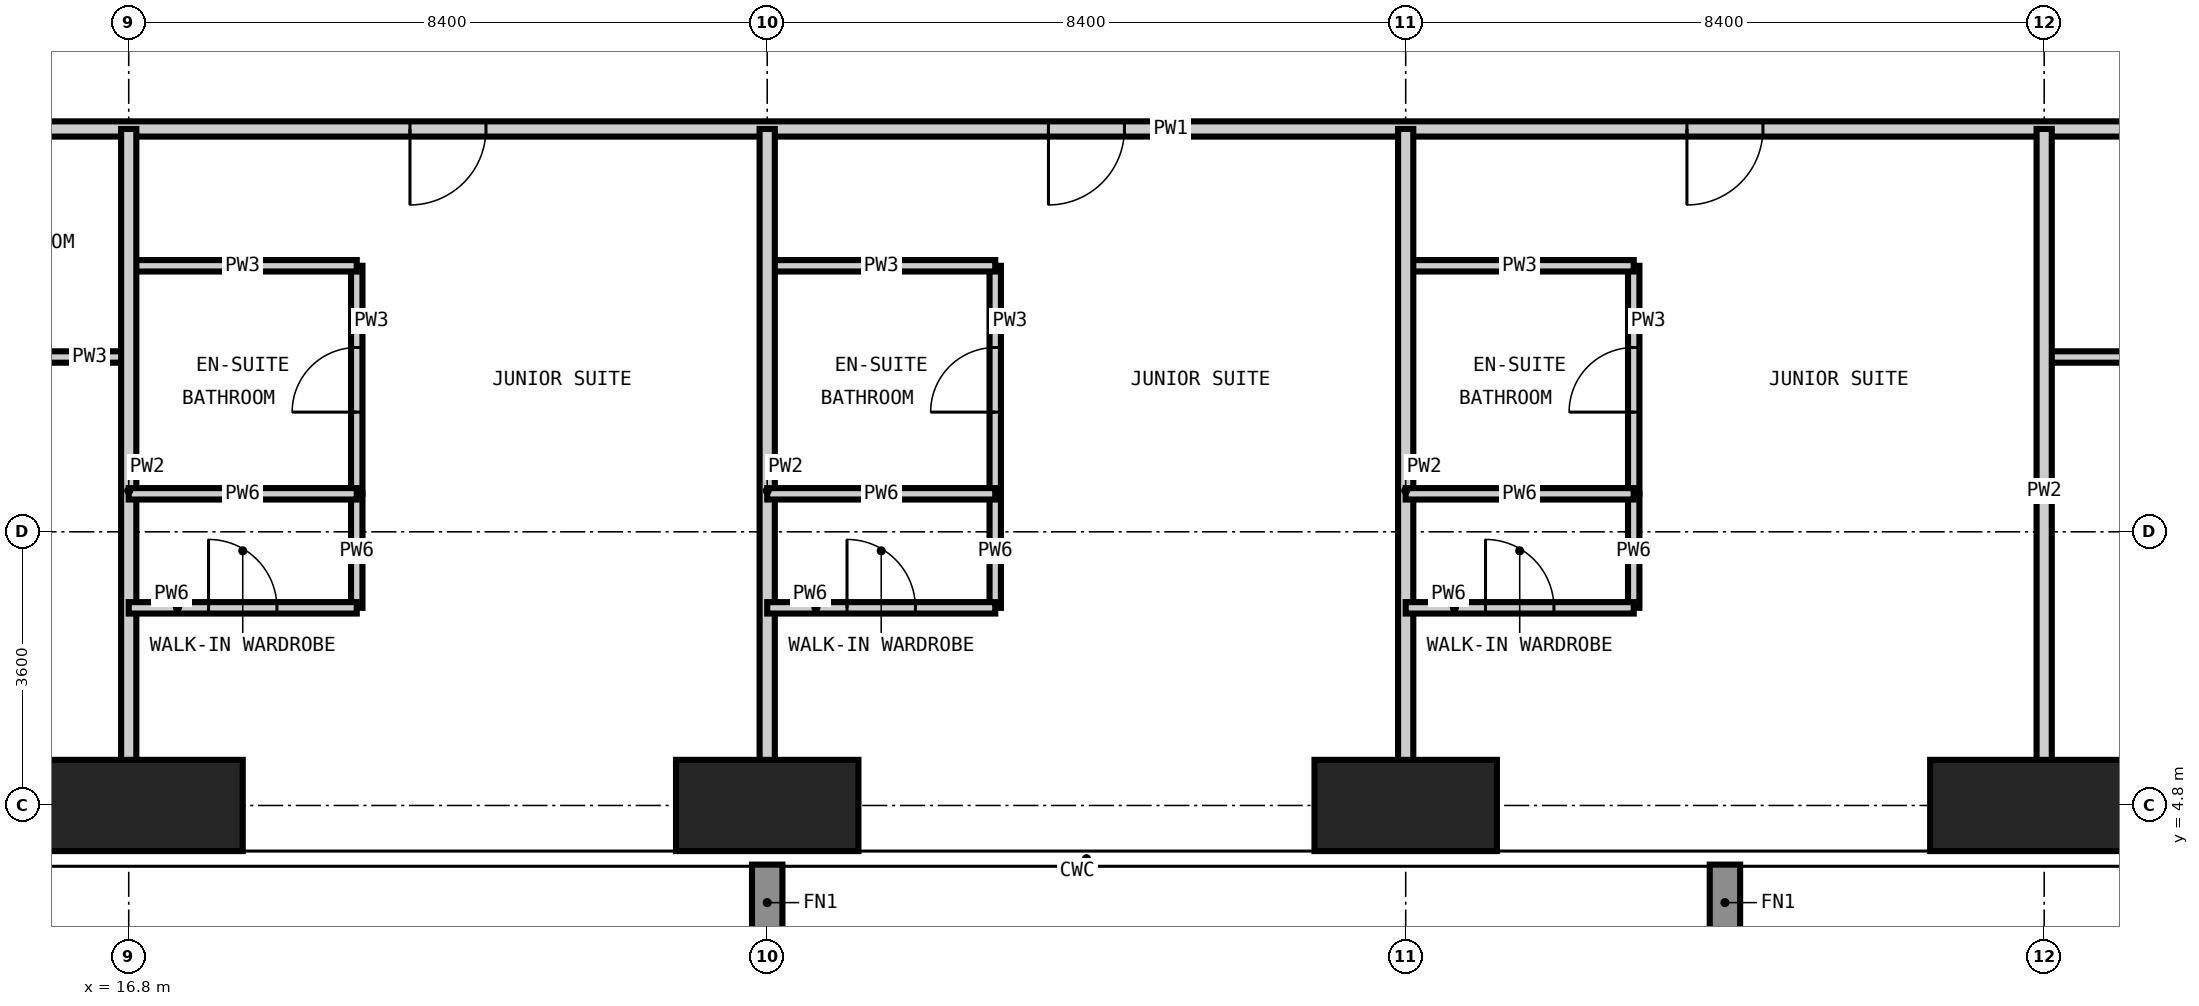
"""IFC4 building model, lengths in metres.
Left out: names, types, materials, properties, quantities, classifications, styles, units other than length and angle.
Written with IfcOpenShell. Run it as: python <this file> out.ifc"""

import sys

from ifc_helpers import new_model, si_unit, direction, frame, frame_2d, origin, origin_2d, place, context, subcontext, project, spatial, rectangle, extrude, element, fill, save


model = new_model("IFC4")
c1 = context("Model", 3, precision=1e-05, world=origin(), true_north=direction((0.0, 1.0)))
c2 = subcontext(c1, "Body", "Model", "MODEL_VIEW")
j1 = project(units=[si_unit("LENGTHUNIT", "METRE"), si_unit("PLANEANGLEUNIT", "RADIAN")], contexts=[c1])
p1 = place(None, origin())
s1 = spatial("IfcSite", under=j1, at=p1, CompositionType="ELEMENT")
p2 = place(p1, origin())
s2 = spatial("IfcBuilding", under=s1, at=p2, CompositionType="ELEMENT")
p3 = place(p2, frame((0.0, 0.0, 162.6)))
s3 = spatial("IfcBuildingStorey", under=s2, at=p3, CompositionType="ELEMENT", Elevation=162.6)
p4 = place(p3, frame((16.8, 4.8, -0.35), z_axis=(0.0, 0.0, 1.0), x_axis=(1.0, 0.0, 0.0)))
e1 = element("IfcColumn", 1, at=p4, inside=s3, PredefinedType="COLUMN", context=c2, shape_type="SweptSolid", body=[
    extrude(rectangle(XDim=3.0, YDim=1.2, at=origin_2d()), origin(), (0.0, 0.0, 1.0), 3.6),
])
for number, where, z_axis, x_axis in (
    (2, (25.2, 4.8, -0.35), (0.0, 0.0, 1.0), (1.0, 0.0, 0.0)),
    (3, (33.6, 4.8, -0.35), (0.0, 0.0, 1.0), (1.0, 0.0, 0.0)),
):
    element("IfcColumn", number, at=place(p3, frame(where, z_axis=z_axis, x_axis=x_axis)), inside=s3, PredefinedType="COLUMN", context=c2, shape_type="SweptSolid", body=[
        extrude(rectangle(XDim=2.4, YDim=1.2, at=origin_2d()), origin(), (0.0, 0.0, 1.0), 3.6),
    ])
p5 = place(p3, frame((42.0, 4.8, -0.35), z_axis=(0.0, 0.0, 1.0), x_axis=(1.0, 0.0, 0.0)))
e4 = element("IfcColumn", 4, at=p5, inside=s3, PredefinedType="COLUMN", context=c2, shape_type="SweptSolid", body=[
    extrude(rectangle(XDim=3.0, YDim=1.2, at=origin_2d()), origin(), (0.0, 0.0, 1.0), 3.6),
])
p6 = place(p3, frame((19.8, 8.9, 0.0), z_axis=(0.0, 0.0, 1.0), x_axis=(0.0, 1.0, 0.0)))
e5 = element("IfcWall", 5, at=p6, inside=s3, PredefinedType="PARTITIONING", context=c2, shape_type="SweptSolid", body=[
    extrude(rectangle(XDim=3.0, YDim=0.15, at=frame_2d((1.5, 0.0))), origin(), (0.0, 0.0, 1.0), 3.25),
])
p7 = place(p6, frame((1.075, 0.0, 0.0)))
e6 = element("IfcOpeningElement", 6, at=p7, cuts=e5, PredefinedType="OPENING", context=c2, shape_type="SweptSolid", body=[
    extrude(rectangle(XDim=0.85, YDim=2.1, at=frame_2d((0.425, 1.05))), frame((0.0, 0.085, 0.0), z_axis=(0.0, -1.0, 0.0), x_axis=(1.0, 0.0, 0.0)), (0.0, 0.0, 1.0), 0.17),
])
p8 = place(p3, frame((28.2, 8.9, 0.0), z_axis=(0.0, 0.0, 1.0), x_axis=(0.0, 1.0, 0.0)))
e7 = element("IfcWall", 7, at=p8, inside=s3, PredefinedType="PARTITIONING", context=c2, shape_type="SweptSolid", body=[
    extrude(rectangle(XDim=3.0, YDim=0.15, at=frame_2d((1.5, 0.0))), origin(), (0.0, 0.0, 1.0), 3.25),
])
p9 = place(p8, frame((1.075, 0.0, 0.0)))
e8 = element("IfcOpeningElement", 8, at=p9, cuts=e7, PredefinedType="OPENING", context=c2, shape_type="SweptSolid", body=[
    extrude(rectangle(XDim=0.85, YDim=2.1, at=frame_2d((0.425, 1.05))), frame((0.0, 0.085, 0.0), z_axis=(0.0, -1.0, 0.0), x_axis=(1.0, 0.0, 0.0)), (0.0, 0.0, 1.0), 0.17),
])
p10 = place(p3, frame((36.6, 8.9, 0.0), z_axis=(0.0, 0.0, 1.0), x_axis=(0.0, 1.0, 0.0)))
e9 = element("IfcWall", 9, at=p10, inside=s3, PredefinedType="PARTITIONING", context=c2, shape_type="SweptSolid", body=[
    extrude(rectangle(XDim=3.0, YDim=0.15, at=frame_2d((1.5, 0.0))), origin(), (0.0, 0.0, 1.0), 3.25),
])
p11 = place(p10, frame((1.075, 0.0, 0.0)))
e10 = element("IfcOpeningElement", 10, at=p11, cuts=e9, PredefinedType="OPENING", context=c2, shape_type="SweptSolid", body=[
    extrude(rectangle(XDim=0.85, YDim=2.1, at=frame_2d((0.425, 1.05))), frame((0.0, 0.085, 0.0), z_axis=(0.0, -1.0, 0.0), x_axis=(1.0, 0.0, 0.0)), (0.0, 0.0, 1.0), 0.17),
])
p12 = place(p3, frame((13.7, 10.7, 0.0), z_axis=(0.0, 0.0, 1.0), x_axis=(1.0, 0.0, 0.0)))
e11 = element("IfcWall", 11, at=p12, inside=s3, PredefinedType="PARTITIONING", context=c2, shape_type="SweptSolid", body=[
    extrude(rectangle(XDim=3.1, YDim=0.15, at=frame_2d((1.55, 0.0))), origin(), (0.0, 0.0, 1.0), 3.25),
])
p13 = place(p12, frame((1.125, 0.0, 0.0)))
e12 = element("IfcOpeningElement", 12, at=p13, cuts=e11, PredefinedType="OPENING", context=c2, shape_type="SweptSolid", body=[
    extrude(rectangle(XDim=0.85, YDim=2.1, at=frame_2d((0.425, 1.05))), frame((0.0, 0.085, 0.0), z_axis=(0.0, -1.0, 0.0), x_axis=(1.0, 0.0, 0.0)), (0.0, 0.0, 1.0), 0.17),
])
p14 = place(p3, frame((42.0, 10.7, 0.0), z_axis=(0.0, 0.0, 1.0), x_axis=(1.0, 0.0, 0.0)))
e13 = element("IfcWall", 13, at=p14, inside=s3, PredefinedType="PARTITIONING", context=c2, shape_type="SweptSolid", body=[
    extrude(rectangle(XDim=3.7, YDim=0.15, at=frame_2d((1.85, 0.0))), origin(), (0.0, 0.0, 1.0), 3.25),
])
p15 = place(p14, frame((1.425, 0.0, 0.0)))
e14 = element("IfcOpeningElement", 14, at=p15, cuts=e13, PredefinedType="OPENING", context=c2, shape_type="SweptSolid", body=[
    extrude(rectangle(XDim=0.85, YDim=2.1, at=frame_2d((0.425, 1.05))), frame((0.0, 0.085, 0.0), z_axis=(0.0, -1.0, 0.0), x_axis=(1.0, 0.0, 0.0)), (0.0, 0.0, 1.0), 0.17),
])
for number, where, z_axis, x_axis in (
    (15, (16.8, 11.9, 0.0), (0.0, 0.0, 1.0), (1.0, 0.0, 0.0)),
    (16, (25.2, 11.9, 0.0), (0.0, 0.0, 1.0), (1.0, 0.0, 0.0)),
    (17, (33.6, 11.9, 0.0), (0.0, 0.0, 1.0), (1.0, 0.0, 0.0)),
):
    element("IfcWall", number, at=place(p3, frame(where, z_axis=z_axis, x_axis=x_axis)), inside=s3, PredefinedType="PARTITIONING", context=c2, shape_type="SweptSolid", body=[
        extrude(rectangle(XDim=3.0, YDim=0.15, at=frame_2d((1.5, 0.0))), origin(), (0.0, 0.0, 1.0), 3.25),
    ])
p16 = place(p3, frame((45.7, 13.7, 0.0), z_axis=(0.0, 0.0, 1.0), x_axis=(-1.0, 0.0, 0.0)))
e18 = element("IfcWall", 18, at=p16, inside=s3, PredefinedType="PARTITIONING", context=c2, shape_type="SweptSolid", body=[
    extrude(rectangle(XDim=32.0, YDim=0.2, at=frame_2d((16.0, 0.0))), origin(), (0.0, 0.0, 1.0), 3.25),
])
p17 = place(p16, frame((24.2, 0.0, 0.0)))
e19 = element("IfcOpeningElement", 19, at=p17, cuts=e18, PredefinedType="OPENING", context=c2, shape_type="SweptSolid", body=[
    extrude(rectangle(XDim=1.0, YDim=2.2, at=frame_2d((0.5, 1.1))), frame((0.0, 0.11, 0.0), z_axis=(0.0, -1.0, 0.0), x_axis=(1.0, 0.0, 0.0)), (0.0, 0.0, 1.0), 0.22),
])
p18 = place(p16, frame((15.8, 0.0, 0.0)))
e20 = element("IfcOpeningElement", 20, at=p18, cuts=e18, PredefinedType="OPENING", context=c2, shape_type="SweptSolid", body=[
    extrude(rectangle(XDim=1.0, YDim=2.2, at=frame_2d((0.5, 1.1))), frame((0.0, 0.11, 0.0), z_axis=(0.0, -1.0, 0.0), x_axis=(1.0, 0.0, 0.0)), (0.0, 0.0, 1.0), 0.22),
])
p19 = place(p16, frame((7.4, 0.0, 0.0)))
e21 = element("IfcOpeningElement", 21, at=p19, cuts=e18, PredefinedType="OPENING", context=c2, shape_type="SweptSolid", body=[
    extrude(rectangle(XDim=1.0, YDim=2.2, at=frame_2d((0.5, 1.1))), frame((0.0, 0.11, 0.0), z_axis=(0.0, -1.0, 0.0), x_axis=(1.0, 0.0, 0.0)), (0.0, 0.0, 1.0), 0.22),
])
for number, where, z_axis, x_axis in (
    (22, (16.8, 4.182, 0.0), (0.0, 0.0, 1.0), (0.0, 1.0, 0.0)),
    (23, (25.2, 4.182, 0.0), (0.0, 0.0, 1.0), (0.0, 1.0, 0.0)),
    (24, (33.6, 4.182, 0.0), (0.0, 0.0, 1.0), (0.0, 1.0, 0.0)),
    (25, (42.0, 4.182, 0.0), (0.0, 0.0, 1.0), (0.0, 1.0, 0.0)),
):
    element("IfcWall", number, at=place(p3, frame(where, z_axis=z_axis, x_axis=x_axis)), inside=s3, PredefinedType="PARTITIONING", context=c2, shape_type="SweptSolid", body=[
        extrude(rectangle(XDim=9.518, YDim=0.2, at=frame_2d((4.759, 0.0))), origin(), (0.0, 0.0, 1.0), 3.25),
    ])
for number, where, z_axis, x_axis in (
    (26, (19.8, 7.4, 0.0), (0.0, 0.0, 1.0), (0.0, 1.0, 0.0)),
    (27, (28.2, 7.4, 0.0), (0.0, 0.0, 1.0), (0.0, 1.0, 0.0)),
    (28, (36.6, 7.4, 0.0), (0.0, 0.0, 1.0), (0.0, 1.0, 0.0)),
):
    element("IfcWall", number, at=place(p3, frame(where, z_axis=z_axis, x_axis=x_axis)), inside=s3, PredefinedType="PARTITIONING", context=c2, shape_type="SweptSolid", body=[
        extrude(rectangle(XDim=1.5, YDim=0.15, at=frame_2d((0.75, 0.0))), origin(), (0.0, 0.0, 1.0), 3.25),
    ])
p20 = place(p3, frame((16.8, 7.4, 0.0), z_axis=(0.0, 0.0, 1.0), x_axis=(1.0, 0.0, 0.0)))
e29 = element("IfcWall", 29, at=p20, inside=s3, PredefinedType="PARTITIONING", context=c2, shape_type="SweptSolid", body=[
    extrude(rectangle(XDim=3.0, YDim=0.15, at=frame_2d((1.5, 0.0))), origin(), (0.0, 0.0, 1.0), 3.25),
])
p21 = place(p20, frame((1.05, 0.0, 0.0)))
e30 = element("IfcOpeningElement", 30, at=p21, cuts=e29, PredefinedType="OPENING", context=c2, shape_type="SweptSolid", body=[
    extrude(rectangle(XDim=0.9, YDim=2.1, at=frame_2d((0.45, 1.05))), frame((0.0, 0.085, 0.0), z_axis=(0.0, -1.0, 0.0), x_axis=(1.0, 0.0, 0.0)), (0.0, 0.0, 1.0), 0.17),
])
p22 = place(p3, frame((25.2, 7.4, 0.0), z_axis=(0.0, 0.0, 1.0), x_axis=(1.0, 0.0, 0.0)))
e31 = element("IfcWall", 31, at=p22, inside=s3, PredefinedType="PARTITIONING", context=c2, shape_type="SweptSolid", body=[
    extrude(rectangle(XDim=3.0, YDim=0.15, at=frame_2d((1.5, 0.0))), origin(), (0.0, 0.0, 1.0), 3.25),
])
p23 = place(p22, frame((1.05, 0.0, 0.0)))
e32 = element("IfcOpeningElement", 32, at=p23, cuts=e31, PredefinedType="OPENING", context=c2, shape_type="SweptSolid", body=[
    extrude(rectangle(XDim=0.9, YDim=2.1, at=frame_2d((0.45, 1.05))), frame((0.0, 0.085, 0.0), z_axis=(0.0, -1.0, 0.0), x_axis=(1.0, 0.0, 0.0)), (0.0, 0.0, 1.0), 0.17),
])
p24 = place(p3, frame((33.6, 7.4, 0.0), z_axis=(0.0, 0.0, 1.0), x_axis=(1.0, 0.0, 0.0)))
e33 = element("IfcWall", 33, at=p24, inside=s3, PredefinedType="PARTITIONING", context=c2, shape_type="SweptSolid", body=[
    extrude(rectangle(XDim=3.0, YDim=0.15, at=frame_2d((1.5, 0.0))), origin(), (0.0, 0.0, 1.0), 3.25),
])
p25 = place(p24, frame((1.05, 0.0, 0.0)))
e34 = element("IfcOpeningElement", 34, at=p25, cuts=e33, PredefinedType="OPENING", context=c2, shape_type="SweptSolid", body=[
    extrude(rectangle(XDim=0.9, YDim=2.1, at=frame_2d((0.45, 1.05))), frame((0.0, 0.085, 0.0), z_axis=(0.0, -1.0, 0.0), x_axis=(1.0, 0.0, 0.0)), (0.0, 0.0, 1.0), 0.17),
])
for number, where, z_axis, x_axis in (
    (35, (16.8, 8.9, 0.0), (0.0, 0.0, 1.0), (1.0, 0.0, 0.0)),
    (36, (25.2, 8.9, 0.0), (0.0, 0.0, 1.0), (1.0, 0.0, 0.0)),
    (37, (33.6, 8.9, 0.0), (0.0, 0.0, 1.0), (1.0, 0.0, 0.0)),
):
    element("IfcWall", number, at=place(p3, frame(where, z_axis=z_axis, x_axis=x_axis)), inside=s3, PredefinedType="PARTITIONING", context=c2, shape_type="SweptSolid", body=[
        extrude(rectangle(XDim=3.0, YDim=0.15, at=frame_2d((1.5, 0.0))), origin(), (0.0, 0.0, 1.0), 3.25),
    ])
p26 = place(p17, origin())
e38 = element("IfcDoor", 38, at=p26, inside=s3, OperationType="SINGLE_SWING_RIGHT", PredefinedType="DOOR", context=c2, shape_type="SweptSolid", body=[
    extrude(rectangle(XDim=1.0, YDim=2.2, at=frame_2d((0.5, 1.1))), frame((0.0, 0.025, 0.0), z_axis=(0.0, -1.0, 0.0), x_axis=(1.0, 0.0, 0.0)), (0.0, 0.0, 1.0), 0.05),
])
fill(e19, e38)
p27 = place(p7, origin())
e39 = element("IfcDoor", 39, at=p27, inside=s3, OperationType="SINGLE_SWING_LEFT", PredefinedType="DOOR", context=c2, shape_type="SweptSolid", body=[
    extrude(rectangle(XDim=0.85, YDim=2.1, at=frame_2d((0.425, 1.05))), frame((0.0, 0.025, 0.0), z_axis=(0.0, -1.0, 0.0), x_axis=(1.0, 0.0, 0.0)), (0.0, 0.0, 1.0), 0.05),
])
fill(e6, e39)
p28 = place(p21, origin())
e40 = element("IfcDoor", 40, at=p28, inside=s3, OperationType="SINGLE_SWING_LEFT", PredefinedType="DOOR", context=c2, shape_type="SweptSolid", body=[
    extrude(rectangle(XDim=0.9, YDim=2.1, at=frame_2d((0.45, 1.05))), frame((0.0, 0.025, 0.0), z_axis=(0.0, -1.0, 0.0), x_axis=(1.0, 0.0, 0.0)), (0.0, 0.0, 1.0), 0.05),
])
fill(e30, e40)
p29 = place(p18, origin())
e41 = element("IfcDoor", 41, at=p29, inside=s3, OperationType="SINGLE_SWING_RIGHT", PredefinedType="DOOR", context=c2, shape_type="SweptSolid", body=[
    extrude(rectangle(XDim=1.0, YDim=2.2, at=frame_2d((0.5, 1.1))), frame((0.0, 0.025, 0.0), z_axis=(0.0, -1.0, 0.0), x_axis=(1.0, 0.0, 0.0)), (0.0, 0.0, 1.0), 0.05),
])
fill(e20, e41)
p30 = place(p9, origin())
e42 = element("IfcDoor", 42, at=p30, inside=s3, OperationType="SINGLE_SWING_LEFT", PredefinedType="DOOR", context=c2, shape_type="SweptSolid", body=[
    extrude(rectangle(XDim=0.85, YDim=2.1, at=frame_2d((0.425, 1.05))), frame((0.0, 0.025, 0.0), z_axis=(0.0, -1.0, 0.0), x_axis=(1.0, 0.0, 0.0)), (0.0, 0.0, 1.0), 0.05),
])
fill(e8, e42)
p31 = place(p23, origin())
e43 = element("IfcDoor", 43, at=p31, inside=s3, OperationType="SINGLE_SWING_LEFT", PredefinedType="DOOR", context=c2, shape_type="SweptSolid", body=[
    extrude(rectangle(XDim=0.9, YDim=2.1, at=frame_2d((0.45, 1.05))), frame((0.0, 0.025, 0.0), z_axis=(0.0, -1.0, 0.0), x_axis=(1.0, 0.0, 0.0)), (0.0, 0.0, 1.0), 0.05),
])
fill(e32, e43)
p32 = place(p19, origin())
e44 = element("IfcDoor", 44, at=p32, inside=s3, OperationType="SINGLE_SWING_RIGHT", PredefinedType="DOOR", context=c2, shape_type="SweptSolid", body=[
    extrude(rectangle(XDim=1.0, YDim=2.2, at=frame_2d((0.5, 1.1))), frame((0.0, 0.025, 0.0), z_axis=(0.0, -1.0, 0.0), x_axis=(1.0, 0.0, 0.0)), (0.0, 0.0, 1.0), 0.05),
])
fill(e21, e44)
p33 = place(p11, origin())
e45 = element("IfcDoor", 45, at=p33, inside=s3, OperationType="SINGLE_SWING_LEFT", PredefinedType="DOOR", context=c2, shape_type="SweptSolid", body=[
    extrude(rectangle(XDim=0.85, YDim=2.1, at=frame_2d((0.425, 1.05))), frame((0.0, 0.025, 0.0), z_axis=(0.0, -1.0, 0.0), x_axis=(1.0, 0.0, 0.0)), (0.0, 0.0, 1.0), 0.05),
])
fill(e10, e45)
p34 = place(p25, origin())
e46 = element("IfcDoor", 46, at=p34, inside=s3, OperationType="SINGLE_SWING_LEFT", PredefinedType="DOOR", context=c2, shape_type="SweptSolid", body=[
    extrude(rectangle(XDim=0.9, YDim=2.1, at=frame_2d((0.45, 1.05))), frame((0.0, 0.025, 0.0), z_axis=(0.0, -1.0, 0.0), x_axis=(1.0, 0.0, 0.0)), (0.0, 0.0, 1.0), 0.05),
])
fill(e34, e46)
save(model, sys.argv[1])
